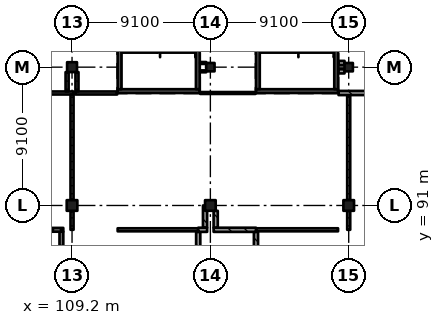
"""IFC4 building model, lengths in metres.
Left out: names, types, materials, properties, quantities, classifications, styles, units other than length and angle.
Written with IfcOpenShell. Run it as: python <this file> out.ifc"""

import sys

from ifc_helpers import new_model, si_unit, direction, frame, frame_2d, origin, origin_2d, place, context, subcontext, project, spatial, rectangle, extrude, element, fill, save


model = new_model("IFC4")
c1 = context("Model", 3, precision=1e-05, world=origin(), true_north=direction((0.0, 1.0)))
c2 = subcontext(c1, "Body", "Model", "MODEL_VIEW")
j1 = project(units=[si_unit("LENGTHUNIT", "METRE"), si_unit("PLANEANGLEUNIT", "RADIAN")], contexts=[c1])
p1 = place(None, origin())
s1 = spatial("IfcSite", under=j1, at=p1, CompositionType="ELEMENT")
p2 = place(p1, origin())
s2 = spatial("IfcBuilding", under=s1, at=p2, CompositionType="ELEMENT")
p3 = place(p2, frame((0.0, 0.0, 15.47)))
s3 = spatial("IfcBuildingStorey", under=s2, at=p3, CompositionType="ELEMENT", Elevation=15.47)
p4 = place(p3, frame((109.2, 91.0, 0.0), z_axis=(0.0, 0.0, 1.0), x_axis=(1.0, 0.0, 0.0)))
e1 = element("IfcColumn", 1, at=p4, inside=s3, PredefinedType="COLUMN", context=c2, shape_type="SweptSolid", body=[
    extrude(rectangle(XDim=0.7, YDim=0.7, at=origin_2d()), origin(), (0.0, 0.0, 1.0), 4.55),
])
p5 = place(p3, frame((109.2, 100.1, 0.0), z_axis=(0.0, 0.0, 1.0), x_axis=(1.0, 0.0, 0.0)))
e2 = element("IfcColumn", 2, at=p5, inside=s3, PredefinedType="COLUMN", context=c2, shape_type="SweptSolid", body=[
    extrude(rectangle(XDim=0.65, YDim=0.65, at=origin_2d()), origin(), (0.0, 0.0, 1.0), 4.55),
])
p6 = place(p3, frame((118.3, 91.0, 0.0), z_axis=(0.0, 0.0, 1.0), x_axis=(1.0, 0.0, 0.0)))
e3 = element("IfcColumn", 3, at=p6, inside=s3, PredefinedType="COLUMN", context=c2, shape_type="SweptSolid", body=[
    extrude(rectangle(XDim=0.7, YDim=0.7, at=origin_2d()), origin(), (0.0, 0.0, 1.0), 4.55),
])
p7 = place(p3, frame((118.3, 100.1, 0.0), z_axis=(0.0, 0.0, 1.0), x_axis=(1.0, 0.0, 0.0)))
e4 = element("IfcColumn", 4, at=p7, inside=s3, PredefinedType="COLUMN", context=c2, shape_type="SweptSolid", body=[
    extrude(rectangle(XDim=0.55, YDim=0.55, at=origin_2d()), origin(), (0.0, 0.0, 1.0), 4.55),
])
p8 = place(p3, frame((127.4, 91.0, 0.0), z_axis=(0.0, 0.0, 1.0), x_axis=(1.0, 0.0, 0.0)))
e5 = element("IfcColumn", 5, at=p8, inside=s3, PredefinedType="COLUMN", context=c2, shape_type="SweptSolid", body=[
    extrude(rectangle(XDim=0.7, YDim=0.7, at=origin_2d()), origin(), (0.0, 0.0, 1.0), 4.55),
])
p9 = place(p3, frame((127.4, 100.1, 0.0), z_axis=(0.0, 0.0, 1.0), x_axis=(1.0, 0.0, 0.0)))
e6 = element("IfcColumn", 6, at=p9, inside=s3, PredefinedType="COLUMN", context=c2, shape_type="SweptSolid", body=[
    extrude(rectangle(XDim=0.55, YDim=0.55, at=origin_2d()), origin(), (0.0, 0.0, 1.0), 4.55),
])
p10 = place(p3, frame((126.7, 98.525, 0.0), z_axis=(0.0, 0.0, 1.0), x_axis=(-1.0, 0.0, 0.0)))
e7 = element("IfcWall", 7, at=p10, inside=s3, PredefinedType="SHEAR", context=c2, shape_type="SweptSolid", body=[
    extrude(rectangle(XDim=5.4, YDim=0.25, at=frame_2d((2.7, 0.0))), origin(), (0.0, 0.0, 1.0), 4.55),
])
p11 = place(p10, frame((1.5, 0.0, 0.0)))
e8 = element("IfcOpeningElement", 8, at=p11, cuts=e7, PredefinedType="OPENING", context=c2, shape_type="SweptSolid", body=[
    extrude(rectangle(XDim=2.4, YDim=2.1, at=frame_2d((1.2, 1.05))), frame((0.0, 0.135, 0.0), z_axis=(0.0, -1.0, 0.0), x_axis=(1.0, 0.0, 0.0)), (0.0, 0.0, 1.0), 0.27),
])
for number, where, z_axis, x_axis in (
    (9, (121.425, 108.25, 0.0), (0.0, 0.0, 1.0), (0.0, -1.0, 0.0)),
    (10, (126.575, 108.25, 0.0), (0.0, 0.0, 1.0), (0.0, -1.0, 0.0)),
):
    element("IfcWall", number, at=place(p3, frame(where, z_axis=z_axis, x_axis=x_axis)), inside=s3, PredefinedType="SHEAR", context=c2, shape_type="SweptSolid", body=[
        extrude(rectangle(XDim=9.6, YDim=0.25, at=frame_2d((4.8, 0.0))), origin(), (0.0, 0.0, 1.0), 4.55),
    ])
p12 = place(p3, frame((117.6, 98.525, 0.0), z_axis=(0.0, 0.0, 1.0), x_axis=(-1.0, 0.0, 0.0)))
e11 = element("IfcWall", 11, at=p12, inside=s3, PredefinedType="SHEAR", context=c2, shape_type="SweptSolid", body=[
    extrude(rectangle(XDim=5.4, YDim=0.25, at=frame_2d((2.7, 0.0))), origin(), (0.0, 0.0, 1.0), 4.55),
])
p13 = place(p12, frame((1.5, 0.0, 0.0)))
e12 = element("IfcOpeningElement", 12, at=p13, cuts=e11, PredefinedType="OPENING", context=c2, shape_type="SweptSolid", body=[
    extrude(rectangle(XDim=2.4, YDim=2.1, at=frame_2d((1.2, 1.05))), frame((0.0, 0.135, 0.0), z_axis=(0.0, -1.0, 0.0), x_axis=(1.0, 0.0, 0.0)), (0.0, 0.0, 1.0), 0.27),
])
for number, where, z_axis, x_axis in (
    (13, (112.325, 108.25, 0.0), (0.0, 0.0, 1.0), (0.0, -1.0, 0.0)),
    (14, (117.475, 108.25, 0.0), (0.0, 0.0, 1.0), (0.0, -1.0, 0.0)),
):
    element("IfcWall", number, at=place(p3, frame(where, z_axis=z_axis, x_axis=x_axis)), inside=s3, PredefinedType="SHEAR", context=c2, shape_type="SweptSolid", body=[
        extrude(rectangle(XDim=9.6, YDim=0.25, at=frame_2d((4.8, 0.0))), origin(), (0.0, 0.0, 1.0), 4.55),
    ])
p14 = place(p3, frame((104.538, 98.4, 0.0), z_axis=(0.0, 0.0, 1.0), x_axis=(1.0, 0.0, 0.0)))
e15 = element("IfcWall", 15, at=p14, inside=s3, PredefinedType="PARTITIONING", context=c2, shape_type="SweptSolid", body=[
    extrude(rectangle(XDim=4.762, YDim=0.2, at=frame_2d((2.381, 0.0))), origin(), (0.0, 0.0, 1.0), 4.3),
])
p15 = place(p14, frame((1.25, 0.0, 0.0)))
e16 = element("IfcOpeningElement", 16, at=p15, cuts=e15, PredefinedType="OPENING", context=c2, shape_type="SweptSolid", body=[
    extrude(rectangle(XDim=1.8, YDim=2.4, at=frame_2d((0.9, 1.2))), frame((0.0, 0.11, 0.0), z_axis=(0.0, -1.0, 0.0), x_axis=(1.0, 0.0, 0.0)), (0.0, 0.0, 1.0), 0.22),
])
p16 = place(p3, frame((108.5, 82.35, 0.0), z_axis=(0.0, 0.0, 1.0), x_axis=(0.0, 1.0, 0.0)))
e17 = element("IfcWall", 17, at=p16, inside=s3, PredefinedType="SOLIDWALL", context=c2, shape_type="SweptSolid", body=[
    extrude(rectangle(XDim=6.925, YDim=0.25, at=frame_2d((3.462, 0.0))), origin(), (0.0, 0.0, 1.0), 4.3),
])
p17 = place(p3, frame((108.625, 89.4, 0.0), z_axis=(0.0, 0.0, 1.0), x_axis=(-1.0, 0.0, 0.0)))
e18 = element("IfcWall", 18, at=p17, inside=s3, PredefinedType="SOLIDWALL", context=c2, shape_type="SweptSolid", body=[
    extrude(rectangle(XDim=3.675, YDim=0.25, at=frame_2d((1.837, 0.0))), origin(), (0.0, 0.0, 1.0), 4.3),
])
p18 = place(p17, frame((1.45, 0.0, 0.0)))
e19 = element("IfcOpeningElement", 19, at=p18, cuts=e18, PredefinedType="OPENING", context=c2, shape_type="SweptSolid", body=[
    extrude(rectangle(XDim=0.8, YDim=2.1, at=frame_2d((0.4, 1.05))), frame((0.0, 0.135, 0.0), z_axis=(0.0, -1.0, 0.0), x_axis=(1.0, 0.0, 0.0)), (0.0, 0.0, 1.0), 0.27),
])
p19 = place(p3, frame((108.875, 98.5, 0.0), z_axis=(0.0, 0.0, 1.0), x_axis=(0.0, 1.0, 0.0)))
e20 = element("IfcWall", 20, at=p19, inside=s3, PredefinedType="PARTITIONING", context=c2, shape_type="SweptSolid", body=[
    extrude(rectangle(XDim=1.275, YDim=0.2, at=frame_2d((0.637, 0.0))), origin(), (0.0, 0.0, 1.0), 4.3),
])
p20 = place(p3, frame((109.2, 89.4, 0.0), z_axis=(0.0, 0.0, 1.0), x_axis=(0.0, 1.0, 0.0)))
e21 = element("IfcWall", 21, at=p20, inside=s3, PredefinedType="PARTITIONING", context=c2, shape_type="SweptSolid", body=[
    extrude(rectangle(XDim=1.25, YDim=0.2, at=frame_2d((0.625, 0.0))), origin(), (0.0, 0.0, 1.0), 3.55),
])
p21 = place(p3, frame((109.2, 91.35, 0.0), z_axis=(0.0, 0.0, 1.0), x_axis=(0.0, 1.0, 0.0)))
e22 = element("IfcWall", 22, at=p21, inside=s3, PredefinedType="PARTITIONING", context=c2, shape_type="SweptSolid", body=[
    extrude(rectangle(XDim=6.95, YDim=0.2, at=frame_2d((3.475, 0.0))), origin(), (0.0, 0.0, 1.0), 3.55),
])
p22 = place(p21, frame((0.85, 0.0, 0.0)))
e23 = element("IfcOpeningElement", 23, at=p22, cuts=e22, PredefinedType="OPENING", context=c2, shape_type="SweptSolid", body=[
    extrude(rectangle(XDim=1.8, YDim=2.4, at=frame_2d((0.9, 1.2))), frame((0.0, 0.11, 0.0), z_axis=(0.0, -1.0, 0.0), x_axis=(1.0, 0.0, 0.0)), (0.0, 0.0, 1.0), 0.22),
])
p23 = place(p21, frame((4.35, 0.0, 0.0)))
e24 = element("IfcOpeningElement", 24, at=p23, cuts=e22, PredefinedType="OPENING", context=c2, shape_type="SweptSolid", body=[
    extrude(rectangle(XDim=1.8, YDim=2.4, at=frame_2d((0.9, 1.2))), frame((0.0, 0.11, 0.0), z_axis=(0.0, -1.0, 0.0), x_axis=(1.0, 0.0, 0.0)), (0.0, 0.0, 1.0), 0.22),
])
p24 = place(p3, frame((109.425, 98.4, 0.0), z_axis=(0.0, 0.0, 1.0), x_axis=(1.0, 0.0, 0.0)))
e25 = element("IfcWall", 25, at=p24, inside=s3, PredefinedType="PARTITIONING", context=c2, shape_type="SweptSolid", body=[
    extrude(rectangle(XDim=2.745, YDim=0.2, at=frame_2d((1.373, 0.0))), origin(), (0.0, 0.0, 1.0), 4.3),
])
p25 = place(p24, frame((0.45, 0.0, 0.0)))
e26 = element("IfcOpeningElement", 26, at=p25, cuts=e25, PredefinedType="OPENING", context=c2, shape_type="SweptSolid", body=[
    extrude(rectangle(XDim=1.8, YDim=2.4, at=frame_2d((0.9, 1.2))), frame((0.0, 0.11, 0.0), z_axis=(0.0, -1.0, 0.0), x_axis=(1.0, 0.0, 0.0)), (0.0, 0.0, 1.0), 0.22),
])
p26 = place(p3, frame((109.525, 99.775, 0.0), z_axis=(0.0, 0.0, 1.0), x_axis=(0.0, -1.0, 0.0)))
e27 = element("IfcWall", 27, at=p26, inside=s3, PredefinedType="PARTITIONING", context=c2, shape_type="SweptSolid", body=[
    extrude(rectangle(XDim=1.275, YDim=0.2, at=frame_2d((0.637, 0.0))), origin(), (0.0, 0.0, 1.0), 4.3),
])
p27 = place(p3, frame((117.5, 86.43, 0.0), z_axis=(0.0, 0.0, 1.0), x_axis=(0.0, 1.0, 0.0)))
e28 = element("IfcWall", 28, at=p27, inside=s3, PredefinedType="SOLIDWALL", context=c2, shape_type="SweptSolid", body=[
    extrude(rectangle(XDim=2.833, YDim=0.275, at=frame_2d((1.416, 0.0))), origin(), (0.0, 0.0, 1.0), 4.3),
])
p28 = place(p3, frame((117.5, 89.4, 0.0), z_axis=(0.0, 0.0, 1.0), x_axis=(-1.0, 0.0, 0.0)))
e29 = element("IfcWall", 29, at=p28, inside=s3, PredefinedType="PARTITIONING", context=c2, shape_type="SweptSolid", body=[
    extrude(rectangle(XDim=5.3, YDim=0.2, at=frame_2d((2.65, 0.0))), origin(), (0.0, 0.0, 1.0), 4.3),
])
p29 = place(p28, frame((1.75, 0.0, 0.0)))
e30 = element("IfcOpeningElement", 30, at=p29, cuts=e29, PredefinedType="OPENING", context=c2, shape_type="SweptSolid", body=[
    extrude(rectangle(XDim=1.8, YDim=2.4, at=frame_2d((0.9, 1.2))), frame((0.0, 0.11, 0.0), z_axis=(0.0, -1.0, 0.0), x_axis=(1.0, 0.0, 0.0)), (0.0, 0.0, 1.0), 0.22),
])
p30 = place(p3, frame((117.63, 98.4, 0.0), z_axis=(0.0, 0.0, 1.0), x_axis=(1.0, 0.0, 0.0)))
e31 = element("IfcWall", 31, at=p30, inside=s3, PredefinedType="PARTITIONING", context=c2, shape_type="SweptSolid", body=[
    extrude(rectangle(XDim=3.64, YDim=0.125, at=frame_2d((1.82, 0.0))), origin(), (0.0, 0.0, 1.0), 4.3),
])
p31 = place(p30, frame((1.35, 0.0, 0.0)))
e32 = element("IfcOpeningElement", 32, at=p31, cuts=e31, PredefinedType="OPENING", context=c2, shape_type="SweptSolid", body=[
    extrude(rectangle(XDim=0.9, YDim=2.1, at=frame_2d((0.45, 1.05))), frame((0.0, 0.073, 0.0), z_axis=(0.0, -1.0, 0.0), x_axis=(1.0, 0.0, 0.0)), (0.0, 0.0, 1.0), 0.145),
])
p32 = place(p3, frame((117.63, 99.825, 0.0), z_axis=(0.0, 0.0, 1.0), x_axis=(1.0, 0.0, 0.0)))
e33 = element("IfcWall", 33, at=p32, inside=s3, PredefinedType="PARTITIONING", context=c2, shape_type="SweptSolid", body=[
    extrude(rectangle(XDim=0.395, YDim=0.125, at=frame_2d((0.198, 0.0))), origin(), (0.0, 0.0, 1.0), 4.3),
])
p33 = place(p3, frame((117.95, 89.538, 0.0), z_axis=(0.0, 0.0, 1.0), x_axis=(0.0, 1.0, 0.0)))
e34 = element("IfcWall", 34, at=p33, inside=s3, PredefinedType="SOLIDWALL", context=c2, shape_type="SweptSolid", body=[
    extrude(rectangle(XDim=1.462, YDim=0.275, at=frame_2d((0.731, 0.0))), origin(), (0.0, 0.0, 1.0), 4.3),
])
p34 = place(p3, frame((118.025, 100.375, 0.0), z_axis=(0.0, 0.0, 1.0), x_axis=(-1.0, 0.0, 0.0)))
e35 = element("IfcWall", 35, at=p34, inside=s3, PredefinedType="PARTITIONING", context=c2, shape_type="SweptSolid", body=[
    extrude(rectangle(XDim=0.395, YDim=0.125, at=frame_2d((0.198, 0.0))), origin(), (0.0, 0.0, 1.0), 4.3),
])
p35 = place(p3, frame((118.087, 89.4, 0.0), z_axis=(0.0, 0.0, 1.0), x_axis=(-1.0, 0.0, 0.0)))
e36 = element("IfcWall", 36, at=p35, inside=s3, PredefinedType="SOLIDWALL", context=c2, shape_type="SweptSolid", body=[
    extrude(rectangle(XDim=0.587, YDim=0.275, at=frame_2d((0.294, 0.0))), origin(), (0.0, 0.0, 1.0), 4.3),
])
p36 = place(p3, frame((118.65, 89.538, 0.0), z_axis=(0.0, 0.0, 1.0), x_axis=(0.0, 1.0, 0.0)))
e37 = element("IfcWall", 37, at=p36, inside=s3, PredefinedType="SOLIDWALL", context=c2, shape_type="SweptSolid", body=[
    extrude(rectangle(XDim=1.112, YDim=0.275, at=frame_2d((0.556, 0.0))), origin(), (0.0, 0.0, 1.0), 4.3),
])
p37 = place(p3, frame((121.3, 82.33, 0.0), z_axis=(0.0, 0.0, 1.0), x_axis=(0.0, 1.0, 0.0)))
e38 = element("IfcWall", 38, at=p37, inside=s3, PredefinedType="SOLIDWALL", context=c2, shape_type="SweptSolid", body=[
    extrude(rectangle(XDim=6.932, YDim=0.275, at=frame_2d((3.466, 0.0))), origin(), (0.0, 0.0, 1.0), 4.3),
])
p38 = place(p3, frame((121.3, 89.4, 0.0), z_axis=(0.0, 0.0, 1.0), x_axis=(-1.0, 0.0, 0.0)))
e39 = element("IfcWall", 39, at=p38, inside=s3, PredefinedType="SOLIDWALL", context=c2, shape_type="SweptSolid", body=[
    extrude(rectangle(XDim=2.788, YDim=0.275, at=frame_2d((1.394, 0.0))), origin(), (0.0, 0.0, 1.0), 4.3),
])
p39 = place(p38, frame((0.75, 0.0, 0.0)))
e40 = element("IfcOpeningElement", 40, at=p39, cuts=e39, PredefinedType="OPENING", context=c2, shape_type="SweptSolid", body=[
    extrude(rectangle(XDim=1.2, YDim=2.4, at=frame_2d((0.6, 1.2))), frame((0.0, 0.147, 0.0), z_axis=(0.0, -1.0, 0.0), x_axis=(1.0, 0.0, 0.0)), (0.0, 0.0, 1.0), 0.295),
])
p40 = place(p3, frame((126.7, 89.4, 0.0), z_axis=(0.0, 0.0, 1.0), x_axis=(-1.0, 0.0, 0.0)))
e41 = element("IfcWall", 41, at=p40, inside=s3, PredefinedType="PARTITIONING", context=c2, shape_type="SweptSolid", body=[
    extrude(rectangle(XDim=5.4, YDim=0.2, at=frame_2d((2.7, 0.0))), origin(), (0.0, 0.0, 1.0), 4.3),
])
p41 = place(p40, frame((1.85, 0.0, 0.0)))
e42 = element("IfcOpeningElement", 42, at=p41, cuts=e41, PredefinedType="OPENING", context=c2, shape_type="SweptSolid", body=[
    extrude(rectangle(XDim=1.8, YDim=2.4, at=frame_2d((0.9, 1.2))), frame((0.0, 0.11, 0.0), z_axis=(0.0, -1.0, 0.0), x_axis=(1.0, 0.0, 0.0)), (0.0, 0.0, 1.0), 0.22),
])
p42 = place(p3, frame((126.73, 98.4, 0.0), z_axis=(0.0, 0.0, 1.0), x_axis=(1.0, 0.0, 0.0)))
e43 = element("IfcWall", 43, at=p42, inside=s3, PredefinedType="SOLIDWALL", context=c2, shape_type="SweptSolid", body=[
    extrude(rectangle(XDim=3.64, YDim=0.275, at=frame_2d((1.82, 0.0))), origin(), (0.0, 0.0, 1.0), 4.3),
])
p43 = place(p42, frame((1.52, 0.0, 0.0)))
e44 = element("IfcOpeningElement", 44, at=p43, cuts=e43, PredefinedType="OPENING", context=c2, shape_type="SweptSolid", body=[
    extrude(rectangle(XDim=1.2, YDim=2.4, at=frame_2d((0.6, 1.2))), frame((0.0, 0.147, 0.0), z_axis=(0.0, -1.0, 0.0), x_axis=(1.0, 0.0, 0.0)), (0.0, 0.0, 1.0), 0.295),
])
for number, where, z_axis, x_axis in (
    (45, (126.73, 99.825, 0.0), (0.0, 0.0, 1.0), (1.0, 0.0, 0.0)),
    (46, (127.125, 100.375, 0.0), (0.0, 0.0, 1.0), (-1.0, 0.0, 0.0)),
):
    element("IfcWall", number, at=place(p3, frame(where, z_axis=z_axis, x_axis=x_axis)), inside=s3, PredefinedType="SOLIDWALL", context=c2, shape_type="SweptSolid", body=[
        extrude(rectangle(XDim=0.395, YDim=0.275, at=frame_2d((0.198, 0.0))), origin(), (0.0, 0.0, 1.0), 4.3),
    ])
p44 = place(p3, frame((127.4, 89.4, 0.0), z_axis=(0.0, 0.0, 1.0), x_axis=(0.0, 1.0, 0.0)))
e47 = element("IfcWall", 47, at=p44, inside=s3, PredefinedType="PARTITIONING", context=c2, shape_type="SweptSolid", body=[
    extrude(rectangle(XDim=1.25, YDim=0.2, at=frame_2d((0.625, 0.0))), origin(), (0.0, 0.0, 1.0), 3.55),
])
p45 = place(p3, frame((127.4, 91.35, 0.0), z_axis=(0.0, 0.0, 1.0), x_axis=(0.0, 1.0, 0.0)))
e48 = element("IfcWall", 48, at=p45, inside=s3, PredefinedType="PARTITIONING", context=c2, shape_type="SweptSolid", body=[
    extrude(rectangle(XDim=6.912, YDim=0.2, at=frame_2d((3.456, 0.0))), origin(), (0.0, 0.0, 1.0), 3.55),
])
p46 = place(p45, frame((0.85, 0.0, 0.0)))
e49 = element("IfcOpeningElement", 49, at=p46, cuts=e48, PredefinedType="OPENING", context=c2, shape_type="SweptSolid", body=[
    extrude(rectangle(XDim=1.8, YDim=2.4, at=frame_2d((0.9, 1.2))), frame((0.0, 0.11, 0.0), z_axis=(0.0, -1.0, 0.0), x_axis=(1.0, 0.0, 0.0)), (0.0, 0.0, 1.0), 0.22),
])
p47 = place(p45, frame((4.25, 0.0, 0.0)))
e50 = element("IfcOpeningElement", 50, at=p47, cuts=e48, PredefinedType="OPENING", context=c2, shape_type="SweptSolid", body=[
    extrude(rectangle(XDim=1.8, YDim=2.4, at=frame_2d((0.9, 1.2))), frame((0.0, 0.11, 0.0), z_axis=(0.0, -1.0, 0.0), x_axis=(1.0, 0.0, 0.0)), (0.0, 0.0, 1.0), 0.22),
])
p48 = place(p39, origin())
e51 = element("IfcDoor", 51, at=p48, inside=s3, OperationType="SINGLE_SWING_RIGHT", PredefinedType="DOOR", context=c2, shape_type="SweptSolid", body=[
    extrude(rectangle(XDim=1.2, YDim=2.4, at=frame_2d((0.6, 1.2))), frame((0.0, 0.025, 0.0), z_axis=(0.0, -1.0, 0.0), x_axis=(1.0, 0.0, 0.0)), (0.0, 0.0, 1.0), 0.05),
])
fill(e40, e51)
p49 = place(p43, origin())
e52 = element("IfcDoor", 52, at=p49, inside=s3, OperationType="SINGLE_SWING_RIGHT", PredefinedType="DOOR", context=c2, shape_type="SweptSolid", body=[
    extrude(rectangle(XDim=1.2, YDim=2.4, at=frame_2d((0.6, 1.2))), frame((0.0, 0.025, 0.0), z_axis=(0.0, -1.0, 0.0), x_axis=(1.0, 0.0, 0.0)), (0.0, 0.0, 1.0), 0.05),
])
fill(e44, e52)
p50 = place(p31, origin())
e53 = element("IfcDoor", 53, at=p50, inside=s3, OperationType="SINGLE_SWING_RIGHT", PredefinedType="DOOR", context=c2, shape_type="SweptSolid", body=[
    extrude(rectangle(XDim=0.9, YDim=2.1, at=frame_2d((0.45, 1.05))), frame((0.0, 0.025, 0.0), z_axis=(0.0, -1.0, 0.0), x_axis=(1.0, 0.0, 0.0)), (0.0, 0.0, 1.0), 0.05),
])
fill(e32, e53)
p51 = place(p46, origin())
e54 = element("IfcDoor", 54, at=p51, inside=s3, OperationType="DOUBLE_DOOR_SINGLE_SWING", PredefinedType="DOOR", context=c2, shape_type="SweptSolid", body=[
    extrude(rectangle(XDim=1.8, YDim=2.4, at=frame_2d((0.9, 1.2))), frame((0.0, 0.025, 0.0), z_axis=(0.0, -1.0, 0.0), x_axis=(1.0, 0.0, 0.0)), (0.0, 0.0, 1.0), 0.05),
])
fill(e49, e54)
p52 = place(p47, origin())
e55 = element("IfcDoor", 55, at=p52, inside=s3, OperationType="DOUBLE_DOOR_SINGLE_SWING", PredefinedType="DOOR", context=c2, shape_type="SweptSolid", body=[
    extrude(rectangle(XDim=1.8, YDim=2.4, at=frame_2d((0.9, 1.2))), frame((0.0, 0.025, 0.0), z_axis=(0.0, -1.0, 0.0), x_axis=(1.0, 0.0, 0.0)), (0.0, 0.0, 1.0), 0.05),
])
fill(e50, e55)
p53 = place(p22, origin())
e56 = element("IfcDoor", 56, at=p53, inside=s3, OperationType="DOUBLE_DOOR_SINGLE_SWING", PredefinedType="DOOR", context=c2, shape_type="SweptSolid", body=[
    extrude(rectangle(XDim=1.8, YDim=2.4, at=frame_2d((0.9, 1.2))), frame((0.0, 0.025, 0.0), z_axis=(0.0, -1.0, 0.0), x_axis=(1.0, 0.0, 0.0)), (0.0, 0.0, 1.0), 0.05),
])
fill(e23, e56)
p54 = place(p23, origin())
e57 = element("IfcDoor", 57, at=p54, inside=s3, OperationType="DOUBLE_DOOR_SINGLE_SWING", PredefinedType="DOOR", context=c2, shape_type="SweptSolid", body=[
    extrude(rectangle(XDim=1.8, YDim=2.4, at=frame_2d((0.9, 1.2))), frame((0.0, 0.025, 0.0), z_axis=(0.0, -1.0, 0.0), x_axis=(1.0, 0.0, 0.0)), (0.0, 0.0, 1.0), 0.05),
])
fill(e24, e57)
p55 = place(p29, origin())
e58 = element("IfcDoor", 58, at=p55, inside=s3, OperationType="DOUBLE_DOOR_SINGLE_SWING", PredefinedType="DOOR", context=c2, shape_type="SweptSolid", body=[
    extrude(rectangle(XDim=1.8, YDim=2.4, at=frame_2d((0.9, 1.2))), frame((0.0, 0.025, 0.0), z_axis=(0.0, -1.0, 0.0), x_axis=(1.0, 0.0, 0.0)), (0.0, 0.0, 1.0), 0.05),
])
fill(e30, e58)
p56 = place(p41, origin())
e59 = element("IfcDoor", 59, at=p56, inside=s3, OperationType="DOUBLE_DOOR_SINGLE_SWING", PredefinedType="DOOR", context=c2, shape_type="SweptSolid", body=[
    extrude(rectangle(XDim=1.8, YDim=2.4, at=frame_2d((0.9, 1.2))), frame((0.0, 0.025, 0.0), z_axis=(0.0, -1.0, 0.0), x_axis=(1.0, 0.0, 0.0)), (0.0, 0.0, 1.0), 0.05),
])
fill(e42, e59)
p57 = place(p25, origin())
e60 = element("IfcDoor", 60, at=p57, inside=s3, OperationType="DOUBLE_DOOR_SINGLE_SWING", PredefinedType="DOOR", context=c2, shape_type="SweptSolid", body=[
    extrude(rectangle(XDim=1.8, YDim=2.4, at=frame_2d((0.9, 1.2))), frame((0.0, 0.025, 0.0), z_axis=(0.0, -1.0, 0.0), x_axis=(1.0, 0.0, 0.0)), (0.0, 0.0, 1.0), 0.05),
])
fill(e26, e60)
p58 = place(p11, origin())
e61 = element("IfcDoor", 61, at=p58, inside=s3, OperationType="DOUBLE_DOOR_SINGLE_SWING", PredefinedType="DOOR", context=c2, shape_type="SweptSolid", body=[
    extrude(rectangle(XDim=2.4, YDim=2.1, at=frame_2d((1.2, 1.05))), frame((0.0, 0.025, 0.0), z_axis=(0.0, -1.0, 0.0), x_axis=(1.0, 0.0, 0.0)), (0.0, 0.0, 1.0), 0.05),
])
fill(e8, e61)
p59 = place(p13, origin())
e62 = element("IfcDoor", 62, at=p59, inside=s3, OperationType="DOUBLE_DOOR_SINGLE_SWING", PredefinedType="DOOR", context=c2, shape_type="SweptSolid", body=[
    extrude(rectangle(XDim=2.4, YDim=2.1, at=frame_2d((1.2, 1.05))), frame((0.0, 0.025, 0.0), z_axis=(0.0, -1.0, 0.0), x_axis=(1.0, 0.0, 0.0)), (0.0, 0.0, 1.0), 0.05),
])
fill(e12, e62)
save(model, sys.argv[1])
